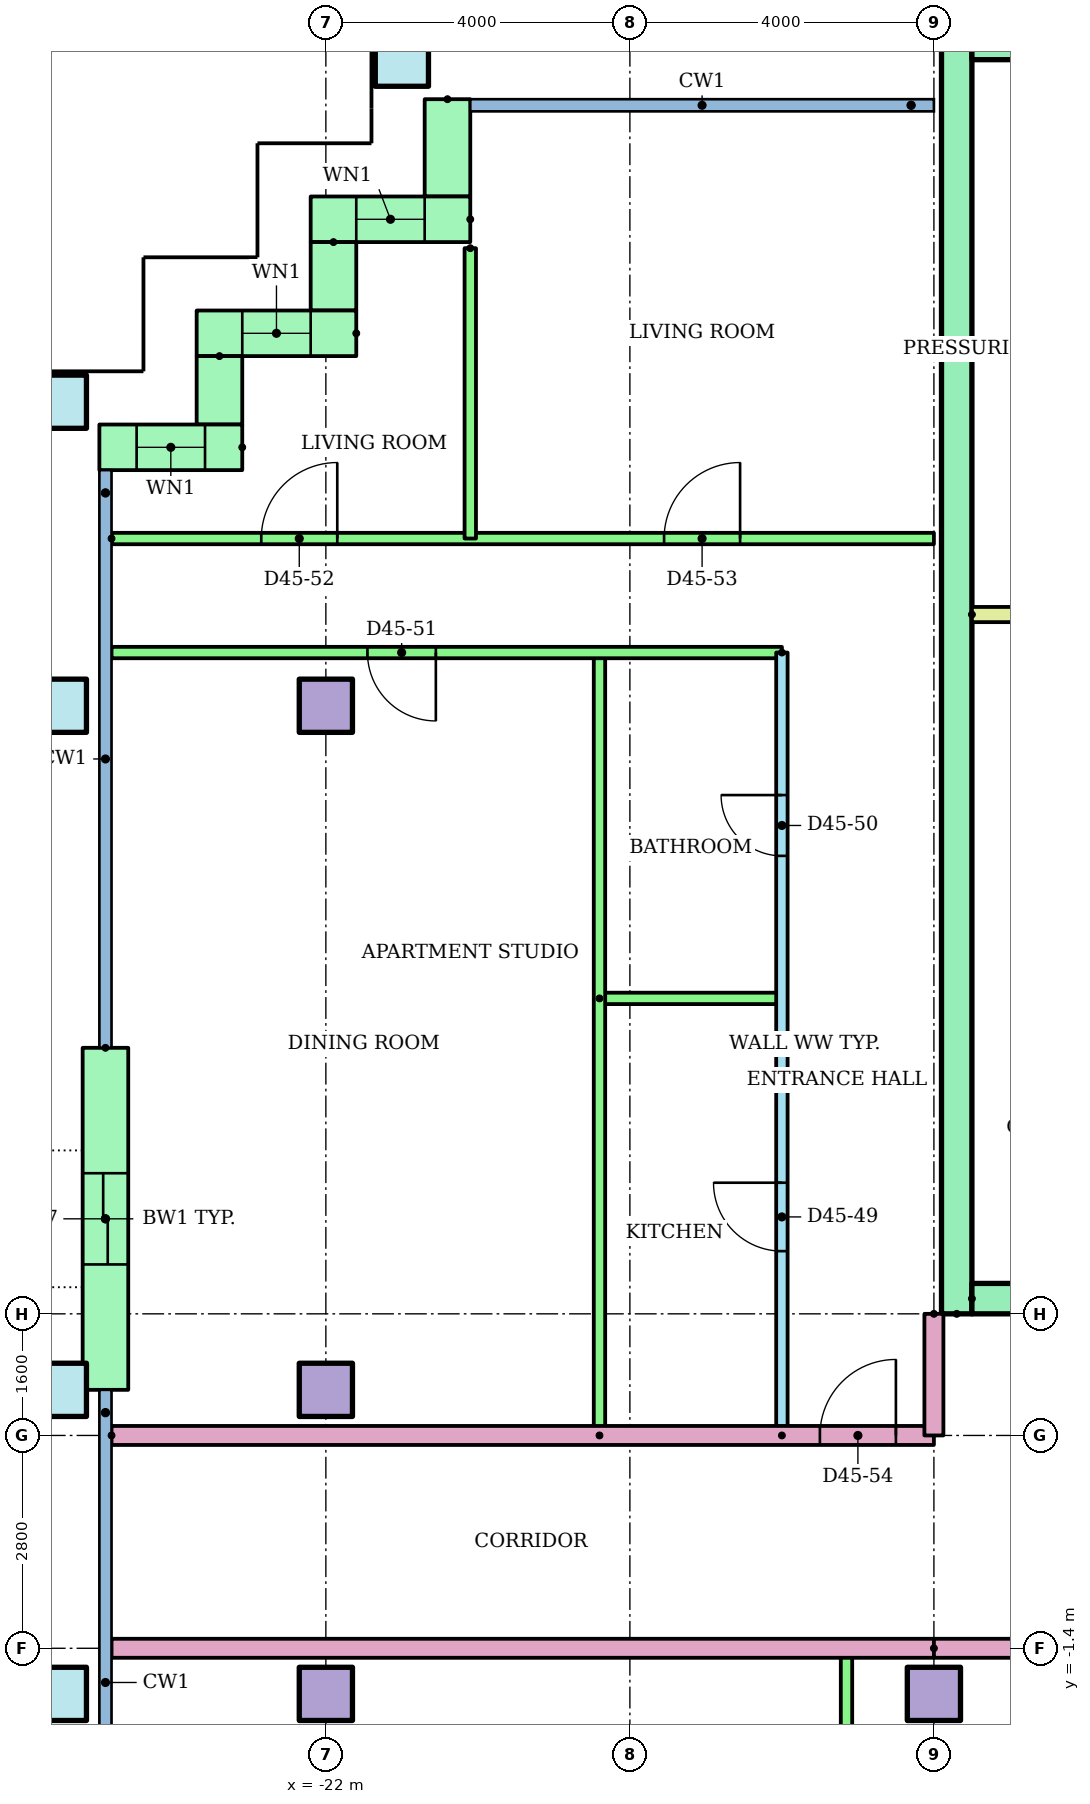
"""IFC4 building model, lengths in metres.
Left out: names, types, materials, properties, quantities, classifications, styles, units other than length and angle.
Written with IfcOpenShell. Run it as: python <this file> out.ifc"""

import sys

from ifc_helpers import new_model, si_unit, direction, frame, frame_2d, origin, origin_2d, place, context, subcontext, project, spatial, rectangle, hollow_rectangle, extrude, element, fill, save


model = new_model("IFC4")
c1 = context("Model", 3, precision=1e-05, world=origin(), true_north=direction((0.0, 1.0)))
c2 = subcontext(c1, "Body", "Model", "MODEL_VIEW")
j1 = project(units=[si_unit("LENGTHUNIT", "METRE"), si_unit("PLANEANGLEUNIT", "RADIAN")], contexts=[c1])
p1 = place(None, origin())
s1 = spatial("IfcSite", under=j1, at=p1, CompositionType="ELEMENT")
p2 = place(p1, origin())
s2 = spatial("IfcBuilding", under=s1, at=p2, CompositionType="ELEMENT")
p3 = place(p2, frame((0.0, 0.0, 174.9)))
s3 = spatial("IfcBuildingStorey", under=s2, at=p3, CompositionType="ELEMENT", Elevation=174.9)
p4 = place(p3, frame((-25.5, -2.0, 0.0)))
e1 = element("IfcColumn", 1, at=p4, inside=s3, PredefinedType="COLUMN", context=c2, shape_type="SweptSolid", body=[
    extrude(hollow_rectangle(XDim=0.7, YDim=0.7, WallThickness=0.036, at=origin_2d()), origin(), (0.0, 0.0, 1.0), 3.2),
])
for number, where in (
    (2, (-22.0, -2.0, 0.0)),
    (3, (-14.0, -2.0, 0.0)),
):
    element("IfcColumn", number, at=place(p3, frame(where)), inside=s3, PredefinedType="COLUMN", context=c2, shape_type="SweptSolid", body=[
        extrude(rectangle(XDim=0.7, YDim=0.7, at=origin_2d()), origin(), (0.0, 0.0, 1.0), 3.2),
    ])
p5 = place(p3, frame((-25.5, 2.0, 0.0)))
e4 = element("IfcColumn", 4, at=p5, inside=s3, PredefinedType="COLUMN", context=c2, shape_type="SweptSolid", body=[
    extrude(hollow_rectangle(XDim=0.7, YDim=0.7, WallThickness=0.036, at=origin_2d()), origin(), (0.0, 0.0, 1.0), 3.2),
])
p6 = place(p3, frame((-22.0, 2.0, 0.0)))
e5 = element("IfcColumn", 5, at=p6, inside=s3, PredefinedType="COLUMN", context=c2, shape_type="SweptSolid", body=[
    extrude(rectangle(XDim=0.7, YDim=0.7, at=origin_2d()), origin(), (0.0, 0.0, 1.0), 3.2),
])
p7 = place(p3, frame((-25.5, 11.0, 0.0)))
e6 = element("IfcColumn", 6, at=p7, inside=s3, PredefinedType="COLUMN", context=c2, shape_type="SweptSolid", body=[
    extrude(hollow_rectangle(XDim=0.7, YDim=0.7, WallThickness=0.036, at=origin_2d()), origin(), (0.0, 0.0, 1.0), 3.2),
])
p8 = place(p3, frame((-22.0, 11.0, 0.0)))
e7 = element("IfcColumn", 7, at=p8, inside=s3, PredefinedType="COLUMN", context=c2, shape_type="SweptSolid", body=[
    extrude(rectangle(XDim=0.7, YDim=0.7, at=origin_2d()), origin(), (0.0, 0.0, 1.0), 3.2),
])
for number, where in (
    (8, (-25.5, 15.0, 0.0)),
    (9, (-21.0, 19.5, 0.0)),
):
    element("IfcColumn", number, at=place(p3, frame(where)), inside=s3, PredefinedType="COLUMN", context=c2, shape_type="SweptSolid", body=[
        extrude(hollow_rectangle(XDim=0.7, YDim=0.7, WallThickness=0.036, at=origin_2d()), origin(), (0.0, 0.0, 1.0), 3.2),
    ])
p9 = place(p3, frame((-20.4, 18.98, 0.0), z_axis=(0.0, 0.0, 1.0), x_axis=(0.0, -1.0, 0.0)))
e10 = element("IfcWall", 10, at=p9, inside=s3, PredefinedType="STANDARD", context=c2, shape_type="SweptSolid", body=[
    extrude(rectangle(XDim=1.28, YDim=0.6, at=frame_2d((0.64, 0.0))), origin(), (0.0, 0.0, 1.0), 2.92),
])
p10 = place(p3, frame((-20.1, 17.4, 0.0), z_axis=(0.0, 0.0, 1.0), x_axis=(-1.0, 0.0, 0.0)))
e11 = element("IfcWall", 11, at=p10, inside=s3, PredefinedType="STANDARD", context=c2, shape_type="SweptSolid", body=[
    extrude(rectangle(XDim=2.1, YDim=0.6, at=frame_2d((1.05, 0.0))), origin(), (0.0, 0.0, 1.0), 2.92),
])
p11 = place(p10, frame((0.6, 0.0, 0.9)))
e12 = element("IfcOpeningElement", 12, at=p11, cuts=e11, PredefinedType="OPENING", context=c2, shape_type="SweptSolid", body=[
    extrude(rectangle(XDim=0.9, YDim=1.5, at=frame_2d((0.45, 0.75))), frame((0.0, 0.31, 0.0), z_axis=(0.0, -1.0, 0.0), x_axis=(1.0, 0.0, 0.0)), (0.0, 0.0, 1.0), 0.62),
])
p12 = place(p3, frame((-21.9, 17.1, 0.0), z_axis=(0.0, 0.0, 1.0), x_axis=(0.0, -1.0, 0.0)))
e13 = element("IfcWall", 13, at=p12, inside=s3, PredefinedType="STANDARD", context=c2, shape_type="SweptSolid", body=[
    extrude(rectangle(XDim=0.9, YDim=0.6, at=frame_2d((0.45, 0.0))), origin(), (0.0, 0.0, 1.0), 2.92),
])
p13 = place(p3, frame((-21.6, 15.9, 0.0), z_axis=(0.0, 0.0, 1.0), x_axis=(-1.0, 0.0, 0.0)))
e14 = element("IfcWall", 14, at=p13, inside=s3, PredefinedType="STANDARD", context=c2, shape_type="SweptSolid", body=[
    extrude(rectangle(XDim=2.1, YDim=0.6, at=frame_2d((1.05, 0.0))), origin(), (0.0, 0.0, 1.0), 2.92),
])
p14 = place(p13, frame((0.6, 0.0, 0.9)))
e15 = element("IfcOpeningElement", 15, at=p14, cuts=e14, PredefinedType="OPENING", context=c2, shape_type="SweptSolid", body=[
    extrude(rectangle(XDim=0.9, YDim=1.5, at=frame_2d((0.45, 0.75))), frame((0.0, 0.31, 0.0), z_axis=(0.0, -1.0, 0.0), x_axis=(1.0, 0.0, 0.0)), (0.0, 0.0, 1.0), 0.62),
])
p15 = place(p3, frame((-23.4, 15.6, 0.0), z_axis=(0.0, 0.0, 1.0), x_axis=(0.0, -1.0, 0.0)))
e16 = element("IfcWall", 16, at=p15, inside=s3, PredefinedType="STANDARD", context=c2, shape_type="SweptSolid", body=[
    extrude(rectangle(XDim=0.9, YDim=0.6, at=frame_2d((0.45, 0.0))), origin(), (0.0, 0.0, 1.0), 2.92),
])
p16 = place(p3, frame((-23.1, 14.4, 0.0), z_axis=(0.0, 0.0, 1.0), x_axis=(-1.0, 0.0, 0.0)))
e17 = element("IfcWall", 17, at=p16, inside=s3, PredefinedType="STANDARD", context=c2, shape_type="SweptSolid", body=[
    extrude(rectangle(XDim=1.88, YDim=0.6, at=frame_2d((0.94, 0.0))), origin(), (0.0, 0.0, 1.0), 2.92),
])
p17 = place(p16, frame((0.49, 0.0, 0.9)))
e18 = element("IfcOpeningElement", 18, at=p17, cuts=e17, PredefinedType="OPENING", context=c2, shape_type="SweptSolid", body=[
    extrude(rectangle(XDim=0.9, YDim=1.5, at=frame_2d((0.45, 0.75))), frame((0.0, 0.31, 0.0), z_axis=(0.0, -1.0, 0.0), x_axis=(1.0, 0.0, 0.0)), (0.0, 0.0, 1.0), 0.62),
])
p18 = place(p3, frame((-24.9, 6.5, 0.0), z_axis=(0.0, 0.0, 1.0), x_axis=(0.0, -1.0, 0.0)))
e19 = element("IfcWall", 19, at=p18, inside=s3, PredefinedType="STANDARD", context=c2, shape_type="SweptSolid", body=[
    extrude(rectangle(XDim=4.5, YDim=0.6, at=frame_2d((2.25, 0.0))), origin(), (0.0, 0.0, 1.0), 2.92),
])
p19 = place(p18, frame((1.65, 0.0, 0.0)))
e20 = element("IfcOpeningElement", 20, at=p19, cuts=e19, PredefinedType="OPENING", context=c2, shape_type="SweptSolid", body=[
    extrude(rectangle(XDim=1.2, YDim=2.1, at=frame_2d((0.6, 1.05))), frame((0.0, 0.31, 0.0), z_axis=(0.0, -1.0, 0.0), x_axis=(1.0, 0.0, 0.0)), (0.0, 0.0, 1.0), 0.62),
])
p20 = place(p3, frame((-13.7, 3.0, 0.0), z_axis=(0.0, 0.0, 1.0), x_axis=(0.0, 1.0, 0.0)))
e21 = element("IfcWall", 21, at=p20, inside=s3, PredefinedType="SHEAR", context=c2, shape_type="SweptSolid", body=[
    extrude(rectangle(XDim=17.0, YDim=0.4, at=frame_2d((8.5, 0.0))), origin(), (0.0, 0.0, 1.0), 2.92),
])
p21 = place(p3, frame((-13.5, 19.7, 0.0)))
e22 = element("IfcWall", 22, at=p21, inside=s3, PredefinedType="SHEAR", context=c2, shape_type="SweptSolid", body=[
    extrude(rectangle(XDim=27.0, YDim=0.4, at=frame_2d((13.5, 0.0))), origin(), (0.0, 0.0, 1.0), 2.92),
])
p22 = place(p3, frame((-13.5, 3.2, 0.0)))
e23 = element("IfcWall", 23, at=p22, inside=s3, PredefinedType="SHEAR", context=c2, shape_type="SweptSolid", body=[
    extrude(rectangle(XDim=27.0, YDim=0.4, at=frame_2d((13.5, 0.0))), origin(), (0.0, 0.0, 1.0), 2.92),
])
p23 = place(p22, frame((22.083, 0.0, 0.0)))
e24 = element("IfcOpeningElement", 24, at=p23, cuts=e23, PredefinedType="OPENING", context=c2, shape_type="SweptSolid", body=[
    extrude(rectangle(XDim=1.1, YDim=2.1, at=frame_2d((0.55, 1.05))), frame((0.0, 0.21, 0.0), z_axis=(0.0, -1.0, 0.0), x_axis=(1.0, 0.0, 0.0)), (0.0, 0.0, 1.0), 0.42),
])
p24 = place(p22, frame((25.128, 0.0, 0.0)))
e25 = element("IfcOpeningElement", 25, at=p24, cuts=e23, PredefinedType="OPENING", context=c2, shape_type="SweptSolid", body=[
    extrude(rectangle(XDim=1.1, YDim=2.1, at=frame_2d((0.55, 1.05))), frame((0.0, 0.21, 0.0), z_axis=(0.0, -1.0, 0.0), x_axis=(1.0, 0.0, 0.0)), (0.0, 0.0, 1.0), 0.42),
])
p25 = place(p22, frame((12.6, 0.0, 0.0)))
e26 = element("IfcOpeningElement", 26, at=p25, cuts=e23, PredefinedType="OPENING", context=c2, shape_type="SweptSolid", body=[
    extrude(rectangle(XDim=1.8, YDim=2.1, at=frame_2d((0.9, 1.05))), frame((0.0, 0.21, 0.0), z_axis=(0.0, -1.0, 0.0), x_axis=(1.0, 0.0, 0.0)), (0.0, 0.0, 1.0), 0.42),
])
p26 = place(p3, frame((-13.5, 12.2, 0.0)))
e27 = element("IfcWall", 27, at=p26, inside=s3, PredefinedType="PARTITIONING", context=c2, shape_type="SweptSolid", body=[
    extrude(rectangle(XDim=3.9, YDim=0.2, at=frame_2d((1.95, 0.0))), origin(), (0.0, 0.0, 1.0), 2.92),
])
p27 = place(p3, frame((-15.15, -9.3, 0.0), z_axis=(0.0, 0.0, 1.0), x_axis=(0.0, 1.0, 0.0)))
e28 = element("IfcWall", 28, at=p27, inside=s3, PredefinedType="PARTITIONING", context=c2, shape_type="SweptSolid", body=[
    extrude(rectangle(XDim=7.9, YDim=0.15, at=frame_2d((3.95, 0.0))), origin(), (0.0, 0.0, 1.0), 2.4),
])
p28 = place(p3, frame((-14.0, -1.4, 0.0), z_axis=(0.0, 0.0, 1.0), x_axis=(-1.0, 0.0, 0.0)))
e29 = element("IfcWall", 29, at=p28, inside=s3, PredefinedType="PARTITIONING", context=c2, shape_type="SweptSolid", body=[
    extrude(rectangle(XDim=10.82, YDim=0.25, at=frame_2d((5.41, 0.0))), origin(), (0.0, 0.0, 1.0), 2.4),
])
p29 = place(p3, frame((-16.0, 1.4, 0.0), z_axis=(0.0, 0.0, 1.0), x_axis=(0.0, 1.0, 0.0)))
e30 = element("IfcWall", 30, at=p29, inside=s3, PredefinedType="PARTITIONING", context=c2, shape_type="SweptSolid", body=[
    extrude(rectangle(XDim=10.3, YDim=0.15, at=frame_2d((5.15, 0.0))), origin(), (0.0, 0.0, 1.0), 2.4),
])
p30 = place(p29, frame((2.425, 0.0, 0.0)))
e31 = element("IfcOpeningElement", 31, at=p30, cuts=e30, PredefinedType="OPENING", context=c2, shape_type="SweptSolid", body=[
    extrude(rectangle(XDim=0.9, YDim=2.1, at=frame_2d((0.45, 1.05))), frame((0.0, 0.085, 0.0), z_axis=(0.0, -1.0, 0.0), x_axis=(1.0, 0.0, 0.0)), (0.0, 0.0, 1.0), 0.17),
])
p31 = place(p29, frame((7.625, 0.0, 0.0)))
e32 = element("IfcOpeningElement", 32, at=p31, cuts=e30, PredefinedType="OPENING", context=c2, shape_type="SweptSolid", body=[
    extrude(rectangle(XDim=0.8, YDim=2.1, at=frame_2d((0.4, 1.05))), frame((0.0, 0.085, 0.0), z_axis=(0.0, -1.0, 0.0), x_axis=(1.0, 0.0, 0.0)), (0.0, 0.0, 1.0), 0.17),
])
p32 = place(p3, frame((-18.4, 7.15, 0.0)))
e33 = element("IfcWall", 33, at=p32, inside=s3, PredefinedType="PARTITIONING", context=c2, shape_type="SweptSolid", body=[
    extrude(rectangle(XDim=2.4, YDim=0.15, at=frame_2d((1.2, 0.0))), origin(), (0.0, 0.0, 1.0), 2.4),
])
p33 = place(p3, frame((-18.4, 1.4, 0.0), z_axis=(0.0, 0.0, 1.0), x_axis=(0.0, 1.0, 0.0)))
e34 = element("IfcWall", 34, at=p33, inside=s3, PredefinedType="PARTITIONING", context=c2, shape_type="SweptSolid", body=[
    extrude(rectangle(XDim=10.3, YDim=0.15, at=frame_2d((5.15, 0.0))), origin(), (0.0, 0.0, 1.0), 2.4),
])
p34 = place(p3, frame((-16.0, 11.7, 0.0), z_axis=(0.0, 0.0, 1.0), x_axis=(-1.0, 0.0, 0.0)))
e35 = element("IfcWall", 35, at=p34, inside=s3, PredefinedType="PARTITIONING", context=c2, shape_type="SweptSolid", body=[
    extrude(rectangle(XDim=8.82, YDim=0.15, at=frame_2d((4.41, 0.0))), origin(), (0.0, 0.0, 1.0), 2.4),
])
p35 = place(p34, frame((4.553, 0.0, 0.0)))
e36 = element("IfcOpeningElement", 36, at=p35, cuts=e35, PredefinedType="OPENING", context=c2, shape_type="SweptSolid", body=[
    extrude(rectangle(XDim=0.9, YDim=2.1, at=frame_2d((0.45, 1.05))), frame((0.0, 0.085, 0.0), z_axis=(0.0, -1.0, 0.0), x_axis=(1.0, 0.0, 0.0)), (0.0, 0.0, 1.0), 0.17),
])
p36 = place(p3, frame((-24.82, 13.2, 0.0)))
e37 = element("IfcWall", 37, at=p36, inside=s3, PredefinedType="PARTITIONING", context=c2, shape_type="SweptSolid", body=[
    extrude(rectangle(XDim=10.82, YDim=0.15, at=frame_2d((5.41, 0.0))), origin(), (0.0, 0.0, 1.0), 2.4),
])
p37 = place(p36, frame((1.97, 0.0, 0.0)))
e38 = element("IfcOpeningElement", 38, at=p37, cuts=e37, PredefinedType="OPENING", context=c2, shape_type="SweptSolid", body=[
    extrude(rectangle(XDim=1.0, YDim=2.1, at=frame_2d((0.5, 1.05))), frame((0.0, 0.085, 0.0), z_axis=(0.0, -1.0, 0.0), x_axis=(1.0, 0.0, 0.0)), (0.0, 0.0, 1.0), 0.17),
])
p38 = place(p36, frame((7.27, 0.0, 0.0)))
e39 = element("IfcOpeningElement", 39, at=p38, cuts=e37, PredefinedType="OPENING", context=c2, shape_type="SweptSolid", body=[
    extrude(rectangle(XDim=1.0, YDim=2.1, at=frame_2d((0.5, 1.05))), frame((0.0, 0.085, 0.0), z_axis=(0.0, -1.0, 0.0), x_axis=(1.0, 0.0, 0.0)), (0.0, 0.0, 1.0), 0.17),
])
p39 = place(p3, frame((-20.1, 17.02, 0.0), z_axis=(0.0, 0.0, 1.0), x_axis=(0.0, -1.0, 0.0)))
e40 = element("IfcWall", 40, at=p39, inside=s3, PredefinedType="PARTITIONING", context=c2, shape_type="SweptSolid", body=[
    extrude(rectangle(XDim=3.82, YDim=0.15, at=frame_2d((1.91, 0.0))), origin(), (0.0, 0.0, 1.0), 2.4),
])
p40 = place(p3, frame((-24.82, 1.4, 0.0)))
e41 = element("IfcWall", 41, at=p40, inside=s3, PredefinedType="PARTITIONING", context=c2, shape_type="SweptSolid", body=[
    extrude(rectangle(XDim=10.82, YDim=0.25, at=frame_2d((5.41, 0.0))), origin(), (0.0, 0.0, 1.0), 2.4),
])
p41 = place(p40, frame((9.32, 0.0, 0.0)))
e42 = element("IfcOpeningElement", 42, at=p41, cuts=e41, PredefinedType="OPENING", context=c2, shape_type="SweptSolid", body=[
    extrude(rectangle(XDim=1.0, YDim=2.1, at=frame_2d((0.5, 1.05))), frame((0.0, 0.135, 0.0), z_axis=(0.0, -1.0, 0.0), x_axis=(1.0, 0.0, 0.0)), (0.0, 0.0, 1.0), 0.27),
])
p42 = place(p3, frame((14.0, -1.4, 0.0), z_axis=(0.0, 0.0, 1.0), x_axis=(-1.0, 0.0, 0.0)))
e43 = element("IfcWall", 43, at=p42, inside=s3, PredefinedType="PARTITIONING", context=c2, shape_type="SweptSolid", body=[
    extrude(rectangle(XDim=28.0, YDim=0.25, at=frame_2d((14.0, 0.0))), origin(), (0.0, 0.0, 1.0), 2.4),
])
p43 = place(p42, frame((12.547, 0.0, 0.0)))
e44 = element("IfcOpeningElement", 44, at=p43, cuts=e43, PredefinedType="OPENING", context=c2, shape_type="SweptSolid", body=[
    extrude(rectangle(XDim=1.0, YDim=2.1, at=frame_2d((0.5, 1.05))), frame((0.0, 0.135, 0.0), z_axis=(0.0, -1.0, 0.0), x_axis=(1.0, 0.0, 0.0)), (0.0, 0.0, 1.0), 0.27),
])
p44 = place(p42, frame((10.453, 0.0, 0.0)))
e45 = element("IfcOpeningElement", 45, at=p44, cuts=e43, PredefinedType="OPENING", context=c2, shape_type="SweptSolid", body=[
    extrude(rectangle(XDim=1.0, YDim=2.1, at=frame_2d((0.5, 1.05))), frame((0.0, 0.135, 0.0), z_axis=(0.0, -1.0, 0.0), x_axis=(1.0, 0.0, 0.0)), (0.0, 0.0, 1.0), 0.27),
])
p45 = place(p3, frame((-14.0, 3.0, 0.0), z_axis=(0.0, 0.0, 1.0), x_axis=(0.0, -1.0, 0.0)))
e46 = element("IfcWall", 46, at=p45, inside=s3, PredefinedType="PARTITIONING", context=c2, shape_type="SweptSolid", body=[
    extrude(rectangle(XDim=1.6, YDim=0.25, at=frame_2d((0.8, 0.0))), origin(), (0.0, 0.0, 1.0), 2.4),
])
p46 = place(p11, origin())
e47 = element("IfcWindow", 47, at=p46, inside=s3, PartitioningType="SINGLE_PANEL", PredefinedType="WINDOW", context=c2, shape_type="SweptSolid", body=[
    extrude(rectangle(XDim=0.9, YDim=1.5, at=frame_2d((0.45, 0.75))), frame((0.0, 0.03, 0.0), z_axis=(0.0, -1.0, 0.0), x_axis=(1.0, 0.0, 0.0)), (0.0, 0.0, 1.0), 0.06),
])
fill(e12, e47)
p47 = place(p14, origin())
e48 = element("IfcWindow", 48, at=p47, inside=s3, PartitioningType="SINGLE_PANEL", PredefinedType="WINDOW", context=c2, shape_type="SweptSolid", body=[
    extrude(rectangle(XDim=0.9, YDim=1.5, at=frame_2d((0.45, 0.75))), frame((0.0, 0.03, 0.0), z_axis=(0.0, -1.0, 0.0), x_axis=(1.0, 0.0, 0.0)), (0.0, 0.0, 1.0), 0.06),
])
fill(e15, e48)
p48 = place(p17, origin())
e49 = element("IfcWindow", 49, at=p48, inside=s3, PartitioningType="SINGLE_PANEL", PredefinedType="WINDOW", context=c2, shape_type="SweptSolid", body=[
    extrude(rectangle(XDim=0.9, YDim=1.5, at=frame_2d((0.45, 0.75))), frame((0.0, 0.03, 0.0), z_axis=(0.0, -1.0, 0.0), x_axis=(1.0, 0.0, 0.0)), (0.0, 0.0, 1.0), 0.06),
])
fill(e18, e49)
p49 = place(p30, origin())
e50 = element("IfcDoor", 50, at=p49, inside=s3, OperationType="SINGLE_SWING_RIGHT", PredefinedType="DOOR", context=c2, shape_type="SweptSolid", body=[
    extrude(rectangle(XDim=0.9, YDim=2.1, at=frame_2d((0.45, 1.05))), frame((0.0, 0.025, 0.0), z_axis=(0.0, -1.0, 0.0), x_axis=(1.0, 0.0, 0.0)), (0.0, 0.0, 1.0), 0.05),
])
fill(e31, e50)
p50 = place(p31, origin())
e51 = element("IfcDoor", 51, at=p50, inside=s3, OperationType="SINGLE_SWING_RIGHT", PredefinedType="DOOR", context=c2, shape_type="SweptSolid", body=[
    extrude(rectangle(XDim=0.8, YDim=2.1, at=frame_2d((0.4, 1.05))), frame((0.0, 0.025, 0.0), z_axis=(0.0, -1.0, 0.0), x_axis=(1.0, 0.0, 0.0)), (0.0, 0.0, 1.0), 0.05),
])
fill(e32, e51)
p51 = place(p35, origin())
e52 = element("IfcDoor", 52, at=p51, inside=s3, OperationType="SINGLE_SWING_LEFT", PredefinedType="DOOR", context=c2, shape_type="SweptSolid", body=[
    extrude(rectangle(XDim=0.9, YDim=2.1, at=frame_2d((0.45, 1.05))), frame((0.0, 0.025, 0.0), z_axis=(0.0, -1.0, 0.0), x_axis=(1.0, 0.0, 0.0)), (0.0, 0.0, 1.0), 0.05),
])
fill(e36, e52)
p52 = place(p37, origin())
e53 = element("IfcDoor", 53, at=p52, inside=s3, OperationType="SINGLE_SWING_RIGHT", PredefinedType="DOOR", context=c2, shape_type="SweptSolid", body=[
    extrude(rectangle(XDim=1.0, YDim=2.1, at=frame_2d((0.5, 1.05))), frame((0.0, 0.025, 0.0), z_axis=(0.0, -1.0, 0.0), x_axis=(1.0, 0.0, 0.0)), (0.0, 0.0, 1.0), 0.05),
])
fill(e38, e53)
p53 = place(p38, origin())
e54 = element("IfcDoor", 54, at=p53, inside=s3, OperationType="SINGLE_SWING_RIGHT", PredefinedType="DOOR", context=c2, shape_type="SweptSolid", body=[
    extrude(rectangle(XDim=1.0, YDim=2.1, at=frame_2d((0.5, 1.05))), frame((0.0, 0.025, 0.0), z_axis=(0.0, -1.0, 0.0), x_axis=(1.0, 0.0, 0.0)), (0.0, 0.0, 1.0), 0.05),
])
fill(e39, e54)
p54 = place(p41, origin())
e55 = element("IfcDoor", 55, at=p54, inside=s3, OperationType="SINGLE_SWING_RIGHT", PredefinedType="DOOR", context=c2, shape_type="SweptSolid", body=[
    extrude(rectangle(XDim=1.0, YDim=2.1, at=frame_2d((0.5, 1.05))), frame((0.0, 0.025, 0.0), z_axis=(0.0, -1.0, 0.0), x_axis=(1.0, 0.0, 0.0)), (0.0, 0.0, 1.0), 0.05),
])
fill(e42, e55)
p55 = place(p19, origin())
e56 = element("IfcDoor", 56, at=p55, inside=s3, OperationType="SLIDING_TO_LEFT", PredefinedType="DOOR", context=c2, shape_type="SweptSolid", body=[
    extrude(rectangle(XDim=1.2, YDim=2.1, at=frame_2d((0.6, 1.05))), frame((0.0, 0.025, 0.0), z_axis=(0.0, -1.0, 0.0), x_axis=(1.0, 0.0, 0.0)), (0.0, 0.0, 1.0), 0.05),
])
fill(e20, e56)
save(model, sys.argv[1])
